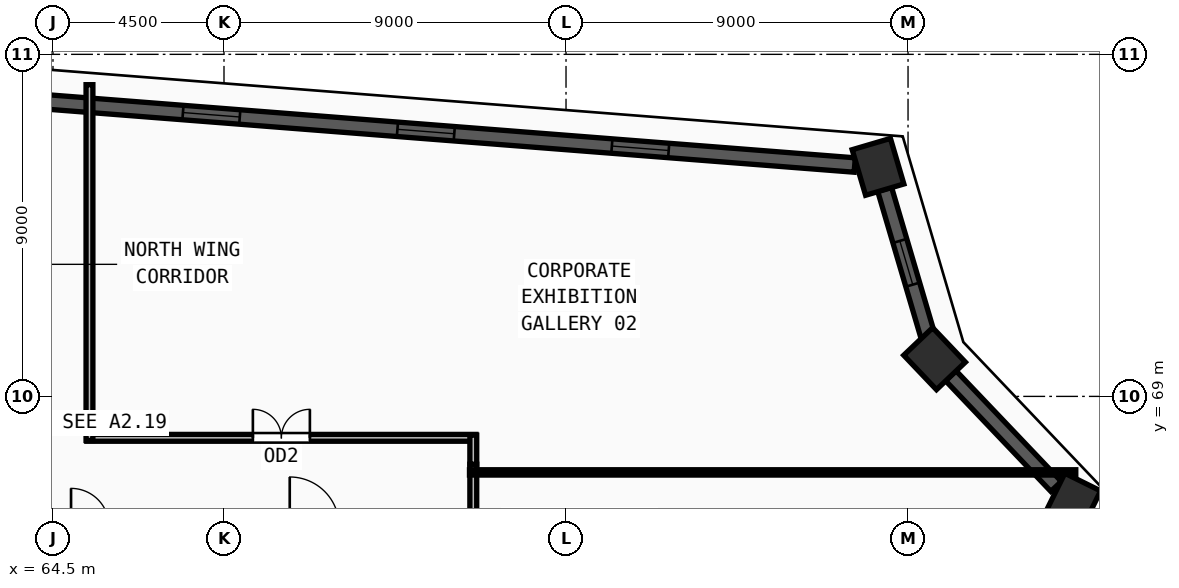
"""IFC4 building model, lengths in metres.
Left out: names, types, materials, properties, quantities, classifications, styles, units other than length and angle.
Written with IfcOpenShell. Run it as: python <this file> out.ifc"""

import sys

from ifc_helpers import new_model, si_unit, direction, frame, frame_2d, origin, origin_2d, place, context, subcontext, project, spatial, rectangle, extrude, source, transform, mapped, element, fill, save


model = new_model("IFC4")
c1 = context("Model", 3, precision=1e-05, world=origin(), true_north=direction((0.0, 1.0)))
c2 = subcontext(c1, "Body", "Model", "MODEL_VIEW")
j1 = project(units=[si_unit("LENGTHUNIT", "METRE"), si_unit("PLANEANGLEUNIT", "RADIAN")], contexts=[c1])
p1 = place(None, origin())
s1 = spatial("IfcSite", under=j1, at=p1, CompositionType="ELEMENT")
p2 = place(p1, origin())
s2 = spatial("IfcBuilding", under=s1, at=p2, CompositionType="ELEMENT")
p3 = place(p2, frame((0.0, 0.0, 270.0)))
s3 = spatial("IfcBuildingStorey", under=s2, at=p3, CompositionType="ELEMENT", Elevation=270.0)
m1 = source(origin(), c2, "Body", "SweptSolid", [
    extrude(rectangle(XDim=1.25, YDim=1.05, at=origin_2d()), origin(), (0.0, 0.0, 1.0), 3.75),
])
for number, where, z_axis, x_axis in (
    (1, (86.21, 75.04, 0.0), (0.0, 0.0, 1.0), (-0.283, 0.959, 0.0)),
    (2, (87.698, 69.992, 0.0), (0.0, 0.0, 1.0), (-0.689, 0.724, 0.0)),
    (3, (91.32, 66.185, 0.0), (0.0, 0.0, 1.0), (0.443, 0.897, 0.0)),
):
    element("IfcColumn", number, at=place(p3, frame(where, z_axis=z_axis, x_axis=x_axis)), inside=s3, PredefinedType="COLUMN", context=c2, shape_type="MappedRepresentation", body=[
        mapped(m1, transform((0.0, 0.0, 0.0), x_axis=(1.0, 0.0, 0.0), y_axis=(0.0, 1.0, 0.0), z_axis=(0.0, 0.0, 1.0), scale=1.0)),
    ])
p4 = place(p3, frame((90.896, 66.631, 0.0), z_axis=(0.0, 0.0, 1.0), x_axis=(-0.689385443417, 0.724394720028, 0.0)))
e4 = element("IfcWall", 4, at=p4, inside=s3, PredefinedType="SOLIDWALL", context=c2, shape_type="SweptSolid", body=[
    extrude(rectangle(XDim=4.024, YDim=0.38, at=frame_2d((2.012, 0.0))), origin(), (0.0, 0.0, 1.0), 3.57),
])
p5 = place(p3, frame((87.524, 70.582, 0.0), z_axis=(0.0, 0.0, 1.0), x_axis=(-0.282684192533, 0.959213035405, 0.0)))
e5 = element("IfcWall", 5, at=p5, inside=s3, PredefinedType="SOLIDWALL", context=c2, shape_type="SweptSolid", body=[
    extrude(rectangle(XDim=4.032, YDim=0.38, at=frame_2d((2.016, 0.0))), origin(), (0.0, 0.0, 1.0), 3.57),
])
m2 = source(origin(), c2, "Body", "SweptSolid", [
    extrude(rectangle(XDim=1.2, YDim=1.9, at=frame_2d((0.6, 0.95))), frame((0.0, 0.2, 0.0), z_axis=(0.0, -1.0, 0.0), x_axis=(1.0, 0.0, 0.0)), (0.0, 0.0, 1.0), 0.4),
])
p6 = place(p5, frame((1.416, 0.0, 0.55)))
e6 = element("IfcOpeningElement", 6, at=p6, cuts=e5, PredefinedType="OPENING", context=c2, shape_type="MappedRepresentation", body=[
    mapped(m2, transform((0.0, 0.0, 0.0), x_axis=(1.0, 0.0, 0.0), y_axis=(0.0, 1.0, 0.0), z_axis=(0.0, 0.0, 1.0), scale=1.0)),
])
p7 = place(p3, frame((85.597, 75.088, 0.0), z_axis=(0.0, 0.0, 1.0), x_axis=(-0.996963017865, 0.077876447083, 0.0)))
e7 = element("IfcWall", 7, at=p7, inside=s3, PredefinedType="SOLIDWALL", context=c2, shape_type="SweptSolid", body=[
    extrude(rectangle(XDim=22.641, YDim=0.38, at=frame_2d((11.32, 0.0))), origin(), (0.0, 0.0, 1.0), 3.57),
])
m3 = source(origin(), c2, "Body", "SweptSolid", [
    extrude(rectangle(XDim=1.5, YDim=1.9, at=frame_2d((0.75, 0.95))), frame((0.0, 0.2, 0.0), z_axis=(0.0, -1.0, 0.0), x_axis=(1.0, 0.0, 0.0)), (0.0, 0.0, 1.0), 0.4),
])
p8 = place(p7, frame((4.91, 0.0, 0.55)))
e8 = element("IfcOpeningElement", 8, at=p8, cuts=e7, PredefinedType="OPENING", context=c2, shape_type="MappedRepresentation", body=[
    mapped(m3, transform((0.0, 0.0, 0.0), x_axis=(1.0, 0.0, 0.0), y_axis=(0.0, 1.0, 0.0), z_axis=(0.0, 0.0, 1.0), scale=1.0)),
])
p9 = place(p7, frame((10.57, 0.0, 0.55)))
e9 = element("IfcOpeningElement", 9, at=p9, cuts=e7, PredefinedType="OPENING", context=c2, shape_type="MappedRepresentation", body=[
    mapped(m3, transform((0.0, 0.0, 0.0), x_axis=(1.0, 0.0, 0.0), y_axis=(0.0, 1.0, 0.0), z_axis=(0.0, 0.0, 1.0), scale=1.0)),
])
p10 = place(p7, frame((16.231, 0.0, 0.55)))
e10 = element("IfcOpeningElement", 10, at=p10, cuts=e7, PredefinedType="OPENING", context=c2, shape_type="MappedRepresentation", body=[
    mapped(m3, transform((0.0, 0.0, 0.0), x_axis=(1.0, 0.0, 0.0), y_axis=(0.0, 1.0, 0.0), z_axis=(0.0, 0.0, 1.0), scale=1.0)),
])
p11 = place(p3, frame((65.39, 67.91, 0.0), z_axis=(0.0, 0.0, 1.0), x_axis=(1.0, 0.0, 0.0)))
e11 = element("IfcWall", 11, at=p11, inside=s3, PredefinedType="PARTITIONING", context=c2, shape_type="SweptSolid", body=[
    extrude(rectangle(XDim=10.24, YDim=0.18, at=frame_2d((5.12, 0.0))), origin(), (0.0, 0.0, 1.0), 3.205),
])
m4 = source(origin(), c2, "Body", "SweptSolid", [
    extrude(rectangle(XDim=1.5, YDim=2.2, at=frame_2d((0.75, 1.1))), frame((0.0, 0.1, 0.0), z_axis=(0.0, -1.0, 0.0), x_axis=(1.0, 0.0, 0.0)), (0.0, 0.0, 1.0), 0.2),
])
p12 = place(p11, frame((4.37, 0.0, 0.0)))
e12 = element("IfcOpeningElement", 12, at=p12, cuts=e11, PredefinedType="OPENING", context=c2, shape_type="MappedRepresentation", body=[
    mapped(m4, transform((0.0, 0.0, 0.0), x_axis=(1.0, 0.0, 0.0), y_axis=(0.0, 1.0, 0.0), z_axis=(0.0, 0.0, 1.0), scale=1.0)),
])
p13 = place(p3, frame((75.56, 67.215, 0.0), z_axis=(0.0, 0.0, 1.0), x_axis=(0.0, -1.0, 0.0)))
e13 = element("IfcWall", 13, at=p13, inside=s3, PredefinedType="PARTITIONING", context=c2, shape_type="SweptSolid", body=[
    extrude(rectangle(XDim=2.235, YDim=0.18, at=frame_2d((1.118, 0.0))), origin(), (0.0, 0.0, 1.0), 3.57),
])
p14 = place(p3, frame((65.46, 77.202, 0.0), z_axis=(0.0, 0.0, 1.0), x_axis=(0.0, -1.0, 0.0)))
e14 = element("IfcWall", 14, at=p14, inside=s3, PredefinedType="PARTITIONING", context=c2, shape_type="SweptSolid", body=[
    extrude(rectangle(XDim=9.362, YDim=0.18, at=frame_2d((4.681, 0.0))), origin(), (0.0, 0.0, 1.0), 3.57),
])
p15 = place(p3, frame((75.56, 67.98, 0.0), z_axis=(0.0, 0.0, 1.0), x_axis=(0.0, -1.0, 0.0)))
e15 = element("IfcWall", 15, at=p15, inside=s3, PredefinedType="PARTITIONING", context=c2, shape_type="SweptSolid", body=[
    extrude(rectangle(XDim=0.765, YDim=0.18, at=frame_2d((0.382, 0.0))), origin(), (0.0, 0.0, 1.0), 3.57),
])
p16 = place(p3, frame((75.46, 67.0, 0.0), z_axis=(0.0, 0.0, 1.0), x_axis=(1.0, 0.0, 0.0)))
e16 = element("IfcWall", 16, at=p16, inside=s3, PredefinedType="PARTITIONING", context=c2, shape_type="SweptSolid", body=[
    extrude(rectangle(XDim=15.954, YDim=0.14, at=frame_2d((7.977, 0.0))), origin(), (0.0, 0.0, 1.0), 3.57),
])
m5 = source(origin(), c2, "Body", "SweptSolid", [
    extrude(rectangle(XDim=1.2, YDim=1.9, at=frame_2d((0.6, 0.95))), frame((0.0, 0.03, 0.0), z_axis=(0.0, -1.0, 0.0), x_axis=(1.0, 0.0, 0.0)), (0.0, 0.0, 1.0), 0.06),
])
p17 = place(p6, origin())
e17 = element("IfcWindow", 17, at=p17, inside=s3, PartitioningType="SINGLE_PANEL", PredefinedType="WINDOW", context=c2, shape_type="MappedRepresentation", body=[
    mapped(m5, transform((0.0, 0.0, 0.0), x_axis=(1.0, 0.0, 0.0), y_axis=(0.0, 1.0, 0.0), z_axis=(0.0, 0.0, 1.0), scale=1.0)),
])
fill(e6, e17)
m6 = source(origin(), c2, "Body", "SweptSolid", [
    extrude(rectangle(XDim=1.5, YDim=1.9, at=frame_2d((0.75, 0.95))), frame((0.0, 0.03, 0.0), z_axis=(0.0, -1.0, 0.0), x_axis=(1.0, 0.0, 0.0)), (0.0, 0.0, 1.0), 0.06),
])
p18 = place(p8, origin())
e18 = element("IfcWindow", 18, at=p18, inside=s3, PartitioningType="DOUBLE_PANEL_VERTICAL", PredefinedType="WINDOW", context=c2, shape_type="MappedRepresentation", body=[
    mapped(m6, transform((0.0, 0.0, 0.0), x_axis=(1.0, 0.0, 0.0), y_axis=(0.0, 1.0, 0.0), z_axis=(0.0, 0.0, 1.0), scale=1.0)),
])
fill(e8, e18)
p19 = place(p9, origin())
e19 = element("IfcWindow", 19, at=p19, inside=s3, PartitioningType="DOUBLE_PANEL_VERTICAL", PredefinedType="WINDOW", context=c2, shape_type="MappedRepresentation", body=[
    mapped(m6, transform((0.0, 0.0, 0.0), x_axis=(1.0, 0.0, 0.0), y_axis=(0.0, 1.0, 0.0), z_axis=(0.0, 0.0, 1.0), scale=1.0)),
])
fill(e9, e19)
p20 = place(p10, origin())
e20 = element("IfcWindow", 20, at=p20, inside=s3, PartitioningType="DOUBLE_PANEL_VERTICAL", PredefinedType="WINDOW", context=c2, shape_type="MappedRepresentation", body=[
    mapped(m6, transform((0.0, 0.0, 0.0), x_axis=(1.0, 0.0, 0.0), y_axis=(0.0, 1.0, 0.0), z_axis=(0.0, 0.0, 1.0), scale=1.0)),
])
fill(e10, e20)
m7 = source(origin(), c2, "Body", "SweptSolid", [
    extrude(rectangle(XDim=1.5, YDim=2.2, at=frame_2d((0.75, 1.1))), frame((0.0, 0.025, 0.0), z_axis=(0.0, -1.0, 0.0), x_axis=(1.0, 0.0, 0.0)), (0.0, 0.0, 1.0), 0.05),
])
p21 = place(p12, origin())
e21 = element("IfcDoor", 21, at=p21, inside=s3, OperationType="DOUBLE_DOOR_SINGLE_SWING", PredefinedType="DOOR", context=c2, shape_type="MappedRepresentation", body=[
    mapped(m7, transform((0.0, 0.0, 0.0), x_axis=(1.0, 0.0, 0.0), y_axis=(0.0, 1.0, 0.0), z_axis=(0.0, 0.0, 1.0), scale=1.0)),
])
fill(e12, e21)
save(model, sys.argv[1])
